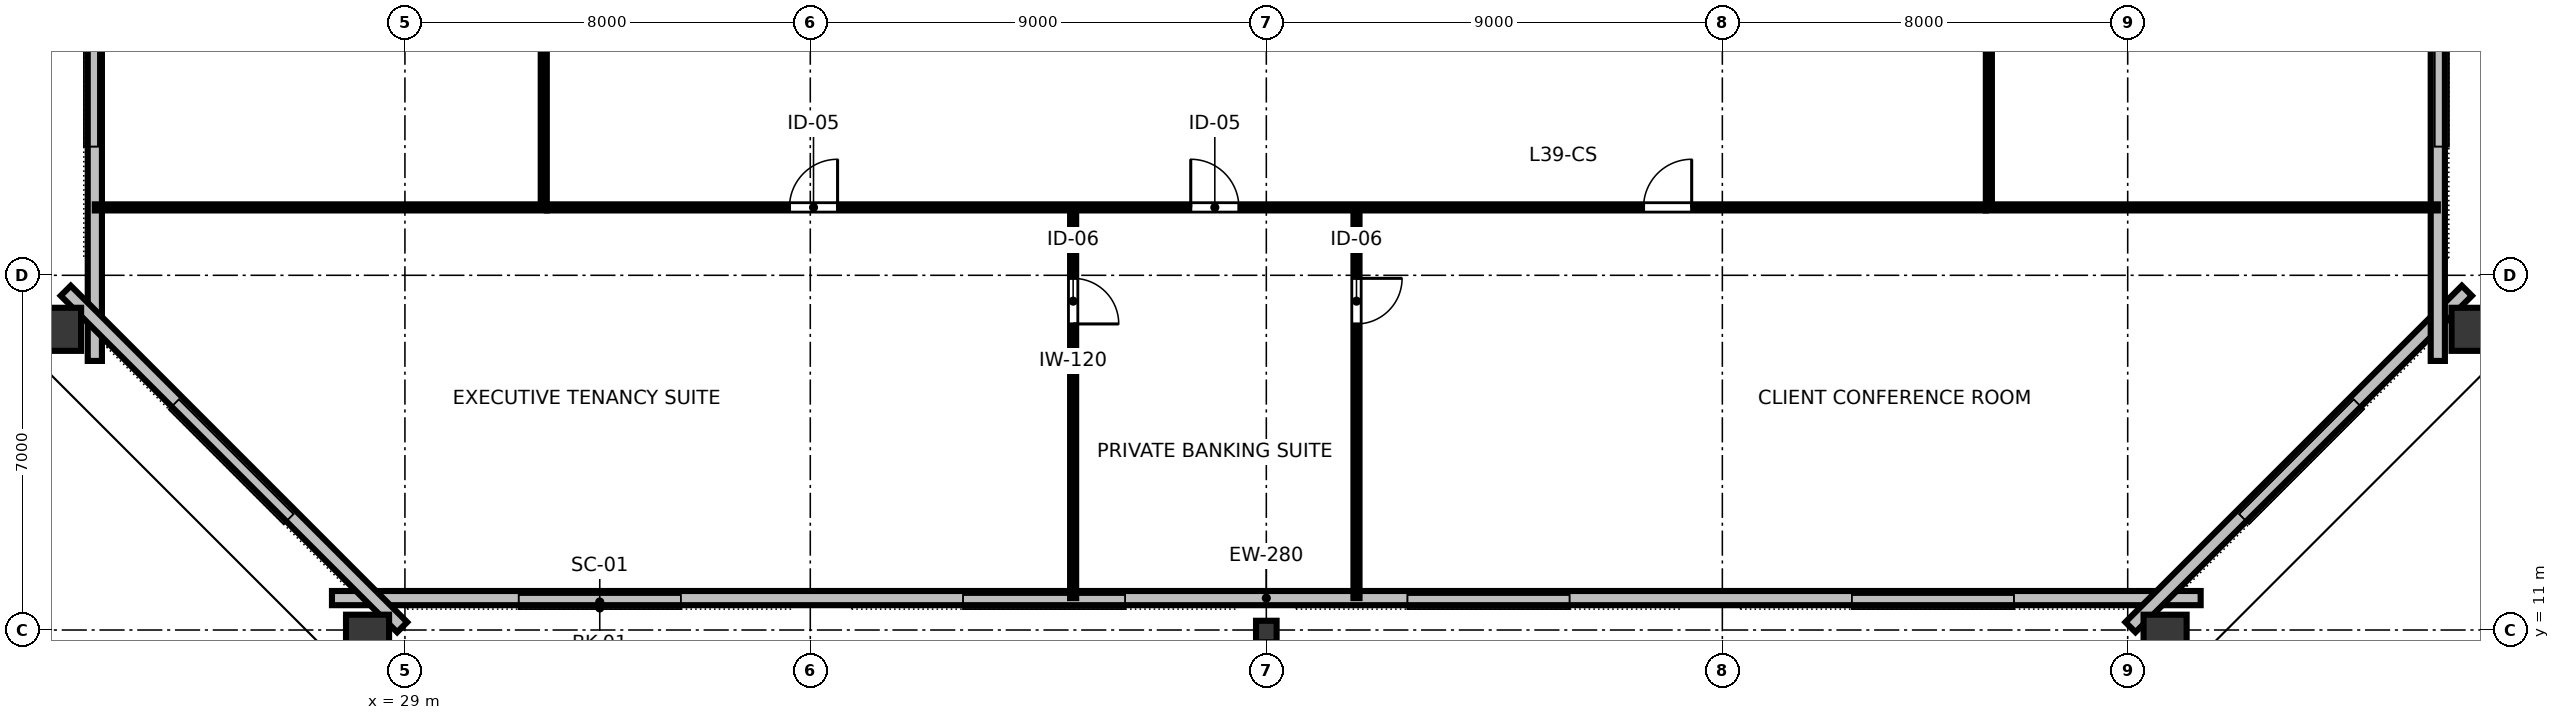
"""IFC4 building model, lengths in metres.
Left out: names, types, materials, properties, quantities, classifications, styles, units other than length and angle.
Written with IfcOpenShell. Run it as: python <this file> out.ifc"""

import sys

from ifc_helpers import new_model, si_unit, direction, frame, frame_2d, origin, origin_2d, place, context, subcontext, project, spatial, rectangle, hollow_rectangle, i_section, extrude, element, fill, save


model = new_model("IFC4")
c1 = context("Model", 3, precision=1e-05, world=origin(), true_north=direction((0.0, 1.0)))
c2 = subcontext(c1, "Body", "Model", "MODEL_VIEW")
j1 = project(units=[si_unit("LENGTHUNIT", "METRE"), si_unit("PLANEANGLEUNIT", "RADIAN")], contexts=[c1])
p1 = place(None, origin())
s1 = spatial("IfcSite", under=j1, at=p1, CompositionType="ELEMENT")
p2 = place(p1, origin())
s2 = spatial("IfcBuilding", under=s1, at=p2, CompositionType="ELEMENT")
p3 = place(p2, frame((0.0, 0.0, 149.2)))
s3 = spatial("IfcBuildingStorey", under=s2, at=p3, CompositionType="ELEMENT", Elevation=149.2)
p4 = place(p3, frame((28.262, 10.802, 0.0), z_axis=(0.0, 0.0, 1.0), x_axis=(1.0, 0.0, 0.0)))
e1 = element("IfcColumn", 1, at=p4, inside=s3, PredefinedType="COLUMN", context=c2, shape_type="SweptSolid", body=[
    extrude(hollow_rectangle(XDim=0.85, YDim=1.0, WallThickness=0.05, at=origin_2d()), origin(), (0.0, 0.0, 1.0), 3.358),
])
p5 = place(p3, frame((46.0, 10.97, 0.0), z_axis=(0.0, 0.0, 1.0), x_axis=(1.0, 0.0, 0.0)))
e2 = element("IfcColumn", 2, at=p5, inside=s3, PredefinedType="COLUMN", context=c2, shape_type="SweptSolid", body=[
    extrude(i_section(OverallWidth=0.406, OverallDepth=0.425, WebThickness=0.033, FlangeThickness=0.052, FilletRadius=0.025, at=origin_2d()), origin(), (0.0, 0.0, 1.0), 3.358),
])
for number, where, z_axis, x_axis in (
    (3, (63.738, 10.802, 0.0), (0.0, 0.0, 1.0), (1.0, 0.0, 0.0)),
    (4, (69.891, 16.934, 0.0), (0.0, 0.0, 1.0), (0.0, 1.0, 0.0)),
    (5, (22.109, 16.934, 0.0), (0.0, 0.0, 1.0), (0.0, 1.0, 0.0)),
):
    element("IfcColumn", number, at=place(p3, frame(where, z_axis=z_axis, x_axis=x_axis)), inside=s3, PredefinedType="COLUMN", context=c2, shape_type="SweptSolid", body=[
        extrude(hollow_rectangle(XDim=0.85, YDim=1.0, WallThickness=0.05, at=origin_2d()), origin(), (0.0, 0.0, 1.0), 3.358),
    ])
p6 = place(p3, frame((27.56, 11.63, 0.0), z_axis=(0.0, 0.0, 1.0), x_axis=(1.0, 0.0, 0.0)))
e6 = element("IfcWall", 6, at=p6, inside=s3, PredefinedType="STANDARD", context=c2, shape_type="SweptSolid", body=[
    extrude(rectangle(XDim=36.88, YDim=0.28, at=frame_2d((18.44, 0.0))), origin(), (0.0, 0.0, 1.0), 3.36),
])
p7 = place(p3, frame((63.054, 11.056, 0.0), z_axis=(0.0, 0.0, 1.0), x_axis=(0.707106781187, 0.707106781187, 0.0)))
e7 = element("IfcWall", 7, at=p7, inside=s3, PredefinedType="STANDARD", context=c2, shape_type="SweptSolid", body=[
    extrude(rectangle(XDim=9.39, YDim=0.28, at=frame_2d((4.695, 0.0))), origin(), (0.0, 0.0, 1.0), 3.36),
])
for number, where, z_axis, x_axis in (
    (8, (69.12, 16.31, 0.0), (0.0, 0.0, 1.0), (0.0, 1.0, 0.0)),
    (9, (22.88, 47.69, 0.0), (0.0, 0.0, 1.0), (0.0, -1.0, 0.0)),
):
    element("IfcWall", number, at=place(p3, frame(where, z_axis=z_axis, x_axis=x_axis)), inside=s3, PredefinedType="STANDARD", context=c2, shape_type="SweptSolid", body=[
        extrude(rectangle(XDim=31.38, YDim=0.28, at=frame_2d((15.69, 0.0))), origin(), (0.0, 0.0, 1.0), 3.36),
    ])
p8 = place(p3, frame((22.306, 17.696, 0.0), z_axis=(0.0, 0.0, 1.0), x_axis=(0.707106781187, -0.707106781187, 0.0)))
e10 = element("IfcWall", 10, at=p8, inside=s3, PredefinedType="STANDARD", context=c2, shape_type="SweptSolid", body=[
    extrude(rectangle(XDim=9.39, YDim=0.28, at=frame_2d((4.695, 0.0))), origin(), (0.0, 0.0, 1.0), 3.36),
])
p9 = place(p3, frame((42.188, 19.34, 0.0), z_axis=(0.0, 0.0, 1.0), x_axis=(0.0, -1.0, 0.0)))
e11 = element("IfcWall", 11, at=p9, inside=s3, PredefinedType="PARTITIONING", context=c2, shape_type="SweptSolid", body=[
    extrude(rectangle(XDim=7.71, YDim=0.12, at=frame_2d((3.855, 0.0))), origin(), (0.0, 0.0, 1.0), 2.64),
])
p10 = place(p9, frame((1.4, 0.0, 0.0)))
e12 = element("IfcOpeningElement", 12, at=p10, cuts=e11, PredefinedType="OPENING", context=c2, shape_type="SweptSolid", body=[
    extrude(rectangle(XDim=0.9, YDim=2.15, at=frame_2d((0.45, 1.075))), frame((0.0, 0.07, 0.0), z_axis=(0.0, -1.0, 0.0), x_axis=(1.0, 0.0, 0.0)), (0.0, 0.0, 1.0), 0.14),
])
p11 = place(p3, frame((47.78, 19.34, 0.0), z_axis=(0.0, 0.0, 1.0), x_axis=(0.0, -1.0, 0.0)))
e13 = element("IfcWall", 13, at=p11, inside=s3, PredefinedType="PARTITIONING", context=c2, shape_type="SweptSolid", body=[
    extrude(rectangle(XDim=7.71, YDim=0.12, at=frame_2d((3.855, 0.0))), origin(), (0.0, 0.0, 1.0), 2.64),
])
p12 = place(p11, frame((1.4, 0.0, 0.0)))
e14 = element("IfcOpeningElement", 14, at=p12, cuts=e13, PredefinedType="OPENING", context=c2, shape_type="SweptSolid", body=[
    extrude(rectangle(XDim=0.9, YDim=2.15, at=frame_2d((0.45, 1.075))), frame((0.0, 0.07, 0.0), z_axis=(0.0, -1.0, 0.0), x_axis=(1.0, 0.0, 0.0)), (0.0, 0.0, 1.0), 0.14),
])
p13 = place(p3, frame((31.8, 19.34, 0.0), z_axis=(0.0, 0.0, 1.0), x_axis=(1.0, 0.0, 0.0)))
e15 = element("IfcWall", 15, at=p13, inside=s3, PredefinedType="PARTITIONING", context=c2, shape_type="SweptSolid", body=[
    extrude(rectangle(XDim=28.4, YDim=0.12, at=frame_2d((14.2, 0.0))), origin(), (0.0, 0.0, 1.0), 2.64),
])
p14 = place(p13, frame((4.789, 0.0, 0.0)))
e16 = element("IfcOpeningElement", 16, at=p14, cuts=e15, PredefinedType="OPENING", context=c2, shape_type="SweptSolid", body=[
    extrude(rectangle(XDim=0.95, YDim=2.15, at=frame_2d((0.475, 1.075))), frame((0.0, 0.07, 0.0), z_axis=(0.0, -1.0, 0.0), x_axis=(1.0, 0.0, 0.0)), (0.0, 0.0, 1.0), 0.14),
])
p15 = place(p13, frame((12.708, 0.0, 0.0)))
e17 = element("IfcOpeningElement", 17, at=p15, cuts=e15, PredefinedType="OPENING", context=c2, shape_type="SweptSolid", body=[
    extrude(rectangle(XDim=0.95, YDim=2.15, at=frame_2d((0.475, 1.075))), frame((0.0, 0.07, 0.0), z_axis=(0.0, -1.0, 0.0), x_axis=(1.0, 0.0, 0.0)), (0.0, 0.0, 1.0), 0.14),
])
p16 = place(p13, frame((21.645, 0.0, 0.0)))
e18 = element("IfcOpeningElement", 18, at=p16, cuts=e15, PredefinedType="OPENING", context=c2, shape_type="SweptSolid", body=[
    extrude(rectangle(XDim=0.95, YDim=2.15, at=frame_2d((0.475, 1.075))), frame((0.0, 0.07, 0.0), z_axis=(0.0, -1.0, 0.0), x_axis=(1.0, 0.0, 0.0)), (0.0, 0.0, 1.0), 0.14),
])
p17 = place(p3, frame((31.74, 19.4, 0.0), z_axis=(0.0, 0.0, 1.0), x_axis=(0.0, 1.0, 0.0)))
e19 = element("IfcWall", 19, at=p17, inside=s3, PredefinedType="PARTITIONING", context=c2, shape_type="SweptSolid", body=[
    extrude(rectangle(XDim=11.58, YDim=0.12, at=frame_2d((5.79, 0.0))), origin(), (0.0, 0.0, 1.0), 2.64),
])
p18 = place(p17, frame((5.415, 0.0, 0.0)))
e20 = element("IfcOpeningElement", 20, at=p18, cuts=e19, PredefinedType="OPENING", context=c2, shape_type="SweptSolid", body=[
    extrude(rectangle(XDim=0.95, YDim=2.15, at=frame_2d((0.475, 1.075))), frame((0.0, 0.07, 0.0), z_axis=(0.0, -1.0, 0.0), x_axis=(1.0, 0.0, 0.0)), (0.0, 0.0, 1.0), 0.14),
])
p19 = place(p3, frame((60.26, 19.4, 0.0), z_axis=(0.0, 0.0, 1.0), x_axis=(0.0, 1.0, 0.0)))
e21 = element("IfcWall", 21, at=p19, inside=s3, PredefinedType="PARTITIONING", context=c2, shape_type="SweptSolid", body=[
    extrude(rectangle(XDim=11.58, YDim=0.12, at=frame_2d((5.79, 0.0))), origin(), (0.0, 0.0, 1.0), 2.64),
])
p20 = place(p19, frame((5.415, 0.0, 0.0)))
e22 = element("IfcOpeningElement", 22, at=p20, cuts=e21, PredefinedType="OPENING", context=c2, shape_type="SweptSolid", body=[
    extrude(rectangle(XDim=0.95, YDim=2.15, at=frame_2d((0.475, 1.075))), frame((0.0, 0.07, 0.0), z_axis=(0.0, -1.0, 0.0), x_axis=(1.0, 0.0, 0.0)), (0.0, 0.0, 1.0), 0.14),
])
for number, where, z_axis, x_axis in (
    (23, (31.8, 19.34, 0.0), (0.0, 0.0, 1.0), (-1.0, 0.0, 0.0)),
    (24, (60.2, 19.34, 0.0), (0.0, 0.0, 1.0), (1.0, 0.0, 0.0)),
):
    element("IfcWall", number, at=place(p3, frame(where, z_axis=z_axis, x_axis=x_axis)), inside=s3, PredefinedType="PARTITIONING", context=c2, shape_type="SweptSolid", body=[
        extrude(rectangle(XDim=8.92, YDim=0.12, at=frame_2d((4.46, 0.0))), origin(), (0.0, 0.0, 1.0), 2.64),
    ])
p21 = place(p10, origin())
e25 = element("IfcDoor", 25, at=p21, inside=s3, OperationType="SINGLE_SWING_RIGHT", PredefinedType="DOOR", context=c2, shape_type="SweptSolid", body=[
    extrude(rectangle(XDim=0.9, YDim=2.15, at=frame_2d((0.45, 1.075))), frame((0.0, 0.025, 0.0), z_axis=(0.0, -1.0, 0.0), x_axis=(1.0, 0.0, 0.0)), (0.0, 0.0, 1.0), 0.05),
])
fill(e12, e25)
p22 = place(p12, origin())
e26 = element("IfcDoor", 26, at=p22, inside=s3, OperationType="SINGLE_SWING_LEFT", PredefinedType="DOOR", context=c2, shape_type="SweptSolid", body=[
    extrude(rectangle(XDim=0.9, YDim=2.15, at=frame_2d((0.45, 1.075))), frame((0.0, 0.025, 0.0), z_axis=(0.0, -1.0, 0.0), x_axis=(1.0, 0.0, 0.0)), (0.0, 0.0, 1.0), 0.05),
])
fill(e14, e26)
p23 = place(p14, origin())
e27 = element("IfcDoor", 27, at=p23, inside=s3, OperationType="SINGLE_SWING_RIGHT", PredefinedType="DOOR", context=c2, shape_type="SweptSolid", body=[
    extrude(rectangle(XDim=0.95, YDim=2.15, at=frame_2d((0.475, 1.075))), frame((0.0, 0.025, 0.0), z_axis=(0.0, -1.0, 0.0), x_axis=(1.0, 0.0, 0.0)), (0.0, 0.0, 1.0), 0.05),
])
fill(e16, e27)
p24 = place(p15, origin())
e28 = element("IfcDoor", 28, at=p24, inside=s3, OperationType="SINGLE_SWING_LEFT", PredefinedType="DOOR", context=c2, shape_type="SweptSolid", body=[
    extrude(rectangle(XDim=0.95, YDim=2.15, at=frame_2d((0.475, 1.075))), frame((0.0, 0.025, 0.0), z_axis=(0.0, -1.0, 0.0), x_axis=(1.0, 0.0, 0.0)), (0.0, 0.0, 1.0), 0.05),
])
fill(e17, e28)
p25 = place(p16, origin())
e29 = element("IfcDoor", 29, at=p25, inside=s3, OperationType="SINGLE_SWING_RIGHT", PredefinedType="DOOR", context=c2, shape_type="SweptSolid", body=[
    extrude(rectangle(XDim=0.95, YDim=2.15, at=frame_2d((0.475, 1.075))), frame((0.0, 0.025, 0.0), z_axis=(0.0, -1.0, 0.0), x_axis=(1.0, 0.0, 0.0)), (0.0, 0.0, 1.0), 0.05),
])
fill(e18, e29)
save(model, sys.argv[1])
